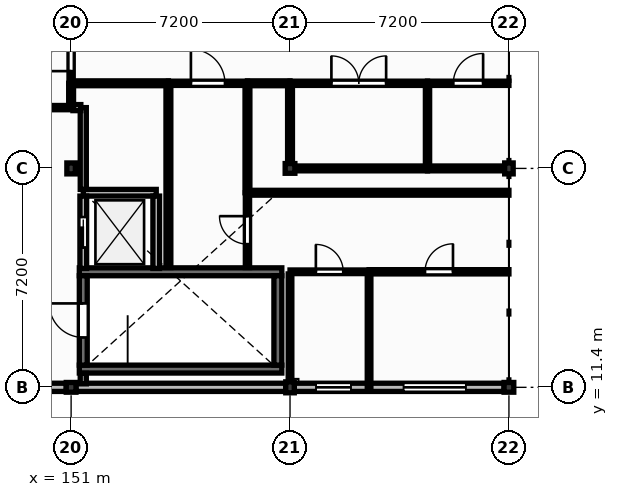
"""IFC4 building model, lengths in metres.
Left out: names, types, materials, properties, quantities, classifications, styles, units other than length and angle.
Written with IfcOpenShell. Run it as: python <this file> out.ifc"""

import sys

from ifc_helpers import new_model, si_unit, direction, frame, frame_2d, origin, origin_2d, place, context, subcontext, project, spatial, rectangle, extrude, element, fill, save


model = new_model("IFC4")
c1 = context("Model", 3, precision=1e-05, world=origin(), true_north=direction((0.0, 1.0)))
c2 = subcontext(c1, "Body", "Model", "MODEL_VIEW")
j1 = project(units=[si_unit("LENGTHUNIT", "METRE"), si_unit("PLANEANGLEUNIT", "RADIAN")], contexts=[c1])
p1 = place(None, origin())
s1 = spatial("IfcSite", under=j1, at=p1, CompositionType="ELEMENT")
p2 = place(p1, origin())
s2 = spatial("IfcBuilding", under=s1, at=p2, CompositionType="ELEMENT")
p3 = place(p2, frame((0.0, 0.0, 9.0)))
s3 = spatial("IfcBuildingStorey", under=s2, at=p3, CompositionType="ELEMENT", Elevation=9.0)
p4 = place(p3, frame((151.0, 11.4, 0.0), z_axis=(0.0, 0.0, 1.0), x_axis=(1.0, 0.0, 0.0)))
e1 = element("IfcColumn", 1, at=p4, inside=s3, PredefinedType="COLUMN", context=c2, shape_type="SweptSolid", body=[
    extrude(rectangle(XDim=0.32, YDim=0.32, at=origin_2d()), origin(), (0.0, 0.0, 1.0), 5.775),
])
p5 = place(p3, frame((151.0, 18.6, 0.0), z_axis=(0.0, 0.0, 1.0), x_axis=(1.0, 0.0, 0.0)))
e2 = element("IfcColumn", 2, at=p5, inside=s3, PredefinedType="COLUMN", context=c2, shape_type="SweptSolid", body=[
    extrude(rectangle(XDim=0.28, YDim=0.36, at=origin_2d()), origin(), (0.0, 0.0, 1.0), 5.775),
])
p6 = place(p3, frame((158.2, 11.4, 0.0), z_axis=(0.0, 0.0, 1.0), x_axis=(1.0, 0.0, 0.0)))
e3 = element("IfcColumn", 3, at=p6, inside=s3, PredefinedType="COLUMN", context=c2, shape_type="SweptSolid", body=[
    extrude(rectangle(XDim=0.28, YDim=0.36, at=origin_2d()), origin(), (0.0, 0.0, 1.0), 7.57),
])
p7 = place(p3, frame((158.2, 18.6, 0.0), z_axis=(0.0, 0.0, 1.0), x_axis=(1.0, 0.0, 0.0)))
e4 = element("IfcColumn", 4, at=p7, inside=s3, PredefinedType="COLUMN", context=c2, shape_type="SweptSolid", body=[
    extrude(rectangle(XDim=0.32, YDim=0.32, at=origin_2d()), origin(), (0.0, 0.0, 1.0), 7.57),
])
p8 = place(p3, frame((165.4, 11.4, 0.0), z_axis=(0.0, 0.0, 1.0), x_axis=(1.0, 0.0, 0.0)))
e5 = element("IfcColumn", 5, at=p8, inside=s3, PredefinedType="COLUMN", context=c2, shape_type="SweptSolid", body=[
    extrude(rectangle(XDim=0.32, YDim=0.32, at=origin_2d()), origin(), (0.0, 0.0, 1.0), 9.365),
])
p9 = place(p3, frame((165.4, 18.6, 0.0), z_axis=(0.0, 0.0, 1.0), x_axis=(1.0, 0.0, 0.0)))
e6 = element("IfcColumn", 6, at=p9, inside=s3, PredefinedType="COLUMN", context=c2, shape_type="SweptSolid", body=[
    extrude(rectangle(XDim=0.28, YDim=0.36, at=origin_2d()), origin(), (0.0, 0.0, 1.0), 9.365),
])
p10 = place(p3, frame((143.94, 11.4, 0.0), z_axis=(0.0, 0.0, 1.0), x_axis=(1.0, 0.0, 0.0)))
e7 = element("IfcWall", 7, at=p10, inside=s3, PredefinedType="SOLIDWALL", context=c2, shape_type="SweptSolid", body=[
    extrude(rectangle(XDim=6.9, YDim=0.27, at=frame_2d((3.45, 0.0))), origin(), (0.0, 0.0, 1.0), 3.54),
])
p11 = place(p10, frame((1.065, 0.0, 1.35)))
e8 = element("IfcOpeningElement", 8, at=p11, cuts=e7, PredefinedType="OPENING", context=c2, shape_type="SweptSolid", body=[
    extrude(rectangle(XDim=1.65, YDim=1.4, at=frame_2d((0.825, 0.7))), frame((0.0, 0.145, 0.0), z_axis=(0.0, -1.0, 0.0), x_axis=(1.0, 0.0, 0.0)), (0.0, 0.0, 1.0), 0.29),
])
p12 = place(p10, frame((4.34, 0.0, 1.0)))
e9 = element("IfcOpeningElement", 9, at=p12, cuts=e7, PredefinedType="OPENING", context=c2, shape_type="SweptSolid", body=[
    extrude(rectangle(XDim=1.76, YDim=1.95, at=frame_2d((0.88, 0.975))), frame((0.0, 0.145, 0.0), z_axis=(0.0, -1.0, 0.0), x_axis=(1.0, 0.0, 0.0)), (0.0, 0.0, 1.0), 0.29),
])
p13 = place(p3, frame((151.16, 11.4, 0.0), z_axis=(0.0, 0.0, 1.0), x_axis=(1.0, 0.0, 0.0)))
e10 = element("IfcWall", 10, at=p13, inside=s3, PredefinedType="SOLIDWALL", context=c2, shape_type="SweptSolid", body=[
    extrude(rectangle(XDim=6.9, YDim=0.27, at=frame_2d((3.45, 0.0))), origin(), (0.0, 0.0, 1.0), 3.54),
])
p14 = place(p3, frame((158.34, 11.4, 0.0), z_axis=(0.0, 0.0, 1.0), x_axis=(1.0, 0.0, 0.0)))
e11 = element("IfcWall", 11, at=p14, inside=s3, PredefinedType="SOLIDWALL", context=c2, shape_type="SweptSolid", body=[
    extrude(rectangle(XDim=6.9, YDim=0.27, at=frame_2d((3.45, 0.0))), origin(), (0.0, 0.0, 1.0), 3.54),
])
p15 = place(p14, frame((0.715, 0.0, 1.5)))
e12 = element("IfcOpeningElement", 12, at=p15, cuts=e11, PredefinedType="OPENING", context=c2, shape_type="SweptSolid", body=[
    extrude(rectangle(XDim=1.15, YDim=1.25, at=frame_2d((0.575, 0.625))), frame((0.0, 0.145, 0.0), z_axis=(0.0, -1.0, 0.0), x_axis=(1.0, 0.0, 0.0)), (0.0, 0.0, 1.0), 0.29),
])
p16 = place(p14, frame((3.595, 0.0, 1.0)))
e13 = element("IfcOpeningElement", 13, at=p16, cuts=e11, PredefinedType="OPENING", context=c2, shape_type="SweptSolid", body=[
    extrude(rectangle(XDim=2.05, YDim=1.95, at=frame_2d((1.025, 0.975))), frame((0.0, 0.145, 0.0), z_axis=(0.0, -1.0, 0.0), x_axis=(1.0, 0.0, 0.0)), (0.0, 0.0, 1.0), 0.29),
])
for number, where, z_axis, x_axis in (
    (14, (151.27, 12.0, 0.0), (0.0, 0.0, 1.0), (1.0, 0.0, 0.0)),
    (15, (151.27, 15.2, 0.0), (0.0, 0.0, 1.0), (1.0, 0.0, 0.0)),
):
    element("IfcWall", number, at=place(p3, frame(where, z_axis=z_axis, x_axis=x_axis)), inside=s3, PredefinedType="SHEAR", context=c2, shape_type="SweptSolid", body=[
        extrude(rectangle(XDim=6.66, YDim=0.26, at=frame_2d((3.33, 0.0))), origin(), (0.0, 0.0, 1.0), 3.95),
    ])
p17 = place(p3, frame((151.4, 12.13, 0.0), z_axis=(0.0, 0.0, 1.0), x_axis=(0.0, 1.0, 0.0)))
e16 = element("IfcWall", 16, at=p17, inside=s3, PredefinedType="SHEAR", context=c2, shape_type="SweptSolid", body=[
    extrude(rectangle(XDim=2.94, YDim=0.26, at=frame_2d((1.47, 0.0))), origin(), (0.0, 0.0, 1.0), 3.95),
])
p18 = place(p17, frame((0.91, 0.0, 0.0)))
e17 = element("IfcOpeningElement", 17, at=p18, cuts=e16, PredefinedType="OPENING", context=c2, shape_type="SweptSolid", body=[
    extrude(rectangle(XDim=1.12, YDim=2.1, at=frame_2d((0.56, 1.05))), frame((0.0, 0.14, 0.0), z_axis=(0.0, -1.0, 0.0), x_axis=(1.0, 0.0, 0.0)), (0.0, 0.0, 1.0), 0.28),
])
p19 = place(p3, frame((157.8, 12.13, 0.0), z_axis=(0.0, 0.0, 1.0), x_axis=(0.0, 1.0, 0.0)))
e18 = element("IfcWall", 18, at=p19, inside=s3, PredefinedType="SHEAR", context=c2, shape_type="SweptSolid", body=[
    extrude(rectangle(XDim=2.94, YDim=0.26, at=frame_2d((1.47, 0.0))), origin(), (0.0, 0.0, 1.0), 3.95),
])
p20 = place(p3, frame((151.4, 17.8, 0.0), z_axis=(0.0, 0.0, 1.0), x_axis=(1.0, 0.0, 0.0)))
e19 = element("IfcWall", 19, at=p20, inside=s3, PredefinedType="SOLIDWALL", context=c2, shape_type="SweptSolid", body=[
    extrude(rectangle(XDim=2.4, YDim=0.22, at=frame_2d((1.2, 0.0))), origin(), (0.0, 0.0, 1.0), 3.95),
])
p21 = place(p3, frame((151.4, 15.31, 0.0), z_axis=(0.0, 0.0, 1.0), x_axis=(0.0, 1.0, 0.0)))
e20 = element("IfcWall", 20, at=p21, inside=s3, PredefinedType="SOLIDWALL", context=c2, shape_type="SweptSolid", body=[
    extrude(rectangle(XDim=2.38, YDim=0.22, at=frame_2d((1.19, 0.0))), origin(), (0.0, 0.0, 1.0), 3.95),
])
p22 = place(p21, frame((0.69, 0.0, 0.0)))
e21 = element("IfcOpeningElement", 21, at=p22, cuts=e20, PredefinedType="OPENING", context=c2, shape_type="SweptSolid", body=[
    extrude(rectangle(XDim=1.0, YDim=2.15, at=frame_2d((0.5, 1.075))), frame((0.0, 0.12, 0.0), z_axis=(0.0, -1.0, 0.0), x_axis=(1.0, 0.0, 0.0)), (0.0, 0.0, 1.0), 0.24),
])
p23 = place(p3, frame((153.8, 15.31, 0.0), z_axis=(0.0, 0.0, 1.0), x_axis=(0.0, 1.0, 0.0)))
e22 = element("IfcWall", 22, at=p23, inside=s3, PredefinedType="SOLIDWALL", context=c2, shape_type="SweptSolid", body=[
    extrude(rectangle(XDim=2.38, YDim=0.22, at=frame_2d((1.19, 0.0))), origin(), (0.0, 0.0, 1.0), 3.95),
])
p24 = place(p3, frame((147.6, 20.6, 0.0), z_axis=(0.0, 0.0, 1.0), x_axis=(1.0, 0.0, 0.0)))
e23 = element("IfcWall", 23, at=p24, inside=s3, PredefinedType="PARTITIONING", context=c2, shape_type="SweptSolid", body=[
    extrude(rectangle(XDim=3.4, YDim=0.14, at=frame_2d((1.7, 0.0))), origin(), (0.0, 0.0, 1.0), 3.78),
])
p25 = place(p24, frame((1.24, 0.0, 0.0)))
e24 = element("IfcOpeningElement", 24, at=p25, cuts=e23, PredefinedType="OPENING", context=c2, shape_type="SweptSolid", body=[
    extrude(rectangle(XDim=0.92, YDim=2.1, at=frame_2d((0.46, 1.05))), frame((0.0, 0.08, 0.0), z_axis=(0.0, -1.0, 0.0), x_axis=(1.0, 0.0, 0.0)), (0.0, 0.0, 1.0), 0.16),
])
p26 = place(p3, frame((151.0, 21.4, 0.0), z_axis=(0.0, 0.0, 1.0), x_axis=(0.0, 1.0, 0.0)))
e25 = element("IfcWall", 25, at=p26, inside=s3, PredefinedType="PARTITIONING", context=c2, shape_type="SweptSolid", body=[
    extrude(rectangle(XDim=2.6, YDim=0.14, at=frame_2d((1.3, 0.0))), origin(), (0.0, 0.0, 1.0), 3.78),
])
p27 = place(p26, frame((0.4, 0.0, 0.0)))
e26 = element("IfcOpeningElement", 26, at=p27, cuts=e25, PredefinedType="OPENING", context=c2, shape_type="SweptSolid", body=[
    extrude(rectangle(XDim=1.8, YDim=2.3, at=frame_2d((0.9, 1.15))), frame((0.0, 0.08, 0.0), z_axis=(0.0, -1.0, 0.0), x_axis=(1.0, 0.0, 0.0)), (0.0, 0.0, 1.0), 0.16),
])
p28 = place(p3, frame((154.2, 21.4, 0.0), z_axis=(0.0, 0.0, 1.0), x_axis=(1.0, 0.0, 0.0)))
e27 = element("IfcWall", 27, at=p28, inside=s3, PredefinedType="PARTITIONING", context=c2, shape_type="SweptSolid", body=[
    extrude(rectangle(XDim=2.6, YDim=0.14, at=frame_2d((1.3, 0.0))), origin(), (0.0, 0.0, 1.0), 3.78),
])
p29 = place(p28, frame((0.74, 0.0, 0.0)))
e28 = element("IfcOpeningElement", 28, at=p29, cuts=e27, PredefinedType="OPENING", context=c2, shape_type="SweptSolid", body=[
    extrude(rectangle(XDim=1.12, YDim=2.15, at=frame_2d((0.56, 1.075))), frame((0.0, 0.08, 0.0), z_axis=(0.0, -1.0, 0.0), x_axis=(1.0, 0.0, 0.0)), (0.0, 0.0, 1.0), 0.16),
])
p30 = place(p3, frame((156.8, 15.34, 0.0), z_axis=(0.0, 0.0, 1.0), x_axis=(0.0, 1.0, 0.0)))
e29 = element("IfcWall", 29, at=p30, inside=s3, PredefinedType="PARTITIONING", context=c2, shape_type="SweptSolid", body=[
    extrude(rectangle(XDim=2.46, YDim=0.14, at=frame_2d((1.23, 0.0))), origin(), (0.0, 0.0, 1.0), 3.78),
])
p31 = place(p30, frame((0.77, 0.0, 0.0)))
e30 = element("IfcOpeningElement", 30, at=p31, cuts=e29, PredefinedType="OPENING", context=c2, shape_type="SweptSolid", body=[
    extrude(rectangle(XDim=0.92, YDim=2.1, at=frame_2d((0.46, 1.05))), frame((0.0, 0.08, 0.0), z_axis=(0.0, -1.0, 0.0), x_axis=(1.0, 0.0, 0.0)), (0.0, 0.0, 1.0), 0.16),
])
p32 = place(p3, frame((158.2, 15.2, 0.0), z_axis=(0.0, 0.0, 1.0), x_axis=(1.0, 0.0, 0.0)))
e31 = element("IfcWall", 31, at=p32, inside=s3, PredefinedType="PLUMBINGWALL", context=c2, shape_type="SweptSolid", body=[
    extrude(rectangle(XDim=2.6, YDim=0.12, at=frame_2d((1.3, 0.0))), origin(), (0.0, 0.0, 1.0), 3.78),
])
p33 = place(p32, frame((0.85, 0.0, 0.0)))
e32 = element("IfcOpeningElement", 32, at=p33, cuts=e31, PredefinedType="OPENING", context=c2, shape_type="SweptSolid", body=[
    extrude(rectangle(XDim=0.9, YDim=2.1, at=frame_2d((0.45, 1.05))), frame((0.0, 0.07, 0.0), z_axis=(0.0, -1.0, 0.0), x_axis=(1.0, 0.0, 0.0)), (0.0, 0.0, 1.0), 0.14),
])
p34 = place(p3, frame((158.2, 21.4, 0.0), z_axis=(0.0, 0.0, 1.0), x_axis=(1.0, 0.0, 0.0)))
e33 = element("IfcWall", 33, at=p34, inside=s3, PredefinedType="PARTITIONING", context=c2, shape_type="SweptSolid", body=[
    extrude(rectangle(XDim=4.522, YDim=0.14, at=frame_2d((2.261, 0.0))), origin(), (0.0, 0.0, 1.0), 3.78),
])
p35 = place(p34, frame((1.361, 0.0, 0.0)))
e34 = element("IfcOpeningElement", 34, at=p35, cuts=e33, PredefinedType="OPENING", context=c2, shape_type="SweptSolid", body=[
    extrude(rectangle(XDim=1.8, YDim=2.3, at=frame_2d((0.9, 1.15))), frame((0.0, 0.08, 0.0), z_axis=(0.0, -1.0, 0.0), x_axis=(1.0, 0.0, 0.0)), (0.0, 0.0, 1.0), 0.16),
])
p36 = place(p3, frame((160.8, 11.4, 0.0), z_axis=(0.0, 0.0, 1.0), x_axis=(0.0, 1.0, 0.0)))
e35 = element("IfcWall", 35, at=p36, inside=s3, PredefinedType="PLUMBINGWALL", context=c2, shape_type="SweptSolid", body=[
    extrude(rectangle(XDim=3.73, YDim=0.12, at=frame_2d((1.865, 0.0))), origin(), (0.0, 0.0, 1.0), 3.78),
])
p37 = place(p3, frame((160.8, 15.2, 0.0), z_axis=(0.0, 0.0, 1.0), x_axis=(1.0, 0.0, 0.0)))
e36 = element("IfcWall", 36, at=p37, inside=s3, PredefinedType="PARTITIONING", context=c2, shape_type="SweptSolid", body=[
    extrude(rectangle(XDim=4.6, YDim=0.14, at=frame_2d((2.3, 0.0))), origin(), (0.0, 0.0, 1.0), 3.78),
])
p38 = place(p37, frame((1.84, 0.0, 0.0)))
e37 = element("IfcOpeningElement", 37, at=p38, cuts=e36, PredefinedType="OPENING", context=c2, shape_type="SweptSolid", body=[
    extrude(rectangle(XDim=0.92, YDim=2.1, at=frame_2d((0.46, 1.05))), frame((0.0, 0.08, 0.0), z_axis=(0.0, -1.0, 0.0), x_axis=(1.0, 0.0, 0.0)), (0.0, 0.0, 1.0), 0.16),
])
p39 = place(p3, frame((162.722, 18.6, 0.0), z_axis=(0.0, 0.0, 1.0), x_axis=(0.0, 1.0, 0.0)))
e38 = element("IfcWall", 38, at=p39, inside=s3, PredefinedType="PARTITIONING", context=c2, shape_type="SweptSolid", body=[
    extrude(rectangle(XDim=2.73, YDim=0.14, at=frame_2d((1.365, 0.0))), origin(), (0.0, 0.0, 1.0), 3.78),
])
p40 = place(p3, frame((162.722, 21.4, 0.0), z_axis=(0.0, 0.0, 1.0), x_axis=(1.0, 0.0, 0.0)))
e39 = element("IfcWall", 39, at=p40, inside=s3, PredefinedType="PARTITIONING", context=c2, shape_type="SweptSolid", body=[
    extrude(rectangle(XDim=2.678, YDim=0.14, at=frame_2d((1.339, 0.0))), origin(), (0.0, 0.0, 1.0), 3.78),
])
p41 = place(p40, frame((0.849, 0.0, 0.0)))
e40 = element("IfcOpeningElement", 40, at=p41, cuts=e39, PredefinedType="OPENING", context=c2, shape_type="SweptSolid", body=[
    extrude(rectangle(XDim=0.98, YDim=2.15, at=frame_2d((0.49, 1.075))), frame((0.0, 0.08, 0.0), z_axis=(0.0, -1.0, 0.0), x_axis=(1.0, 0.0, 0.0)), (0.0, 0.0, 1.0), 0.16),
])
p42 = place(p3, frame((151.4, 11.515, 0.0), z_axis=(0.0, 0.0, 1.0), x_axis=(0.0, 1.0, 0.0)))
e41 = element("IfcWall", 41, at=p42, inside=s3, PredefinedType="PARTITIONING", context=c2, shape_type="SweptSolid", body=[
    extrude(rectangle(XDim=0.345, YDim=0.2, at=frame_2d((0.173, 0.0))), origin(), (0.0, 0.0, 1.0), 3.78),
])
p43 = place(p3, frame((151.4, 17.91, 0.0), z_axis=(0.0, 0.0, 1.0), x_axis=(0.0, 1.0, 0.0)))
e42 = element("IfcWall", 42, at=p43, inside=s3, PredefinedType="PARTITIONING", context=c2, shape_type="SweptSolid", body=[
    extrude(rectangle(XDim=2.69, YDim=0.2, at=frame_2d((1.345, 0.0))), origin(), (0.0, 0.0, 1.0), 3.78),
])
p44 = place(p3, frame((151.32, 20.6, 0.0), z_axis=(0.0, 0.0, 1.0), x_axis=(-1.0, 0.0, 0.0)))
e43 = element("IfcWall", 43, at=p44, inside=s3, PredefinedType="PARTITIONING", context=c2, shape_type="SweptSolid", body=[
    extrude(rectangle(XDim=0.26, YDim=0.2, at=frame_2d((0.13, 0.0))), origin(), (0.0, 0.0, 1.0), 3.78),
])
p45 = place(p3, frame((151.0, 20.67, 0.0), z_axis=(0.0, 0.0, 1.0), x_axis=(0.0, 1.0, 0.0)))
e44 = element("IfcWall", 44, at=p45, inside=s3, PredefinedType="PARTITIONING", context=c2, shape_type="SweptSolid", body=[
    extrude(rectangle(XDim=0.73, YDim=0.16, at=frame_2d((0.365, 0.0))), origin(), (0.0, 0.0, 1.0), 3.78),
])
p46 = place(p3, frame((151.0, 21.4, 0.0), z_axis=(0.0, 0.0, 1.0), x_axis=(1.0, 0.0, 0.0)))
e45 = element("IfcWall", 45, at=p46, inside=s3, PredefinedType="PARTITIONING", context=c2, shape_type="SweptSolid", body=[
    extrude(rectangle(XDim=3.2, YDim=0.16, at=frame_2d((1.6, 0.0))), origin(), (0.0, 0.0, 1.0), 3.78),
])
p47 = place(p3, frame((156.8, 21.4, 0.0), z_axis=(0.0, 0.0, 1.0), x_axis=(1.0, 0.0, 0.0)))
e46 = element("IfcWall", 46, at=p47, inside=s3, PredefinedType="PARTITIONING", context=c2, shape_type="SweptSolid", body=[
    extrude(rectangle(XDim=1.4, YDim=0.16, at=frame_2d((0.7, 0.0))), origin(), (0.0, 0.0, 1.0), 3.78),
])
p48 = place(p3, frame((156.8, 17.8, 0.0), z_axis=(0.0, 0.0, 1.0), x_axis=(0.0, 1.0, 0.0)))
e47 = element("IfcWall", 47, at=p48, inside=s3, PredefinedType="PARTITIONING", context=c2, shape_type="SweptSolid", body=[
    extrude(rectangle(XDim=3.53, YDim=0.16, at=frame_2d((1.765, 0.0))), origin(), (0.0, 0.0, 1.0), 3.78),
])
p49 = place(p3, frame((154.2, 15.34, 0.0), z_axis=(0.0, 0.0, 1.0), x_axis=(0.0, 1.0, 0.0)))
e48 = element("IfcWall", 48, at=p49, inside=s3, PredefinedType="PARTITIONING", context=c2, shape_type="SweptSolid", body=[
    extrude(rectangle(XDim=5.99, YDim=0.16, at=frame_2d((2.995, 0.0))), origin(), (0.0, 0.0, 1.0), 3.78),
])
p50 = place(p3, frame((165.4, 17.8, 0.0), z_axis=(0.0, 0.0, 1.0), x_axis=(-1.0, 0.0, 0.0)))
e49 = element("IfcWall", 49, at=p50, inside=s3, PredefinedType="PARTITIONING", context=c2, shape_type="SweptSolid", body=[
    extrude(rectangle(XDim=8.6, YDim=0.16, at=frame_2d((4.3, 0.0))), origin(), (0.0, 0.0, 1.0), 3.78),
])
p51 = place(p3, frame((158.2, 11.58, 0.0), z_axis=(0.0, 0.0, 1.0), x_axis=(0.0, 1.0, 0.0)))
e50 = element("IfcWall", 50, at=p51, inside=s3, PredefinedType="PLUMBINGWALL", context=c2, shape_type="SweptSolid", body=[
    extrude(rectangle(XDim=3.55, YDim=0.12, at=frame_2d((1.775, 0.0))), origin(), (0.0, 0.0, 1.0), 3.78),
])
p52 = place(p3, frame((158.36, 18.6, 0.0), z_axis=(0.0, 0.0, 1.0), x_axis=(1.0, 0.0, 0.0)))
e51 = element("IfcWall", 51, at=p52, inside=s3, PredefinedType="PARTITIONING", context=c2, shape_type="SweptSolid", body=[
    extrude(rectangle(XDim=4.362, YDim=0.16, at=frame_2d((2.181, 0.0))), origin(), (0.0, 0.0, 1.0), 3.78),
])
p53 = place(p3, frame((158.2, 18.76, 0.0), z_axis=(0.0, 0.0, 1.0), x_axis=(0.0, 1.0, 0.0)))
e52 = element("IfcWall", 52, at=p53, inside=s3, PredefinedType="PARTITIONING", context=c2, shape_type="SweptSolid", body=[
    extrude(rectangle(XDim=2.57, YDim=0.16, at=frame_2d((1.285, 0.0))), origin(), (0.0, 0.0, 1.0), 3.78),
])
p54 = place(p3, frame((162.722, 18.6, 0.0), z_axis=(0.0, 0.0, 1.0), x_axis=(1.0, 0.0, 0.0)))
e53 = element("IfcWall", 53, at=p54, inside=s3, PredefinedType="PARTITIONING", context=c2, shape_type="SweptSolid", body=[
    extrude(rectangle(XDim=2.538, YDim=0.16, at=frame_2d((1.269, 0.0))), origin(), (0.0, 0.0, 1.0), 3.78),
])
p55 = place(p15, origin())
e54 = element("IfcWindow", 54, at=p55, inside=s3, PartitioningType="SINGLE_PANEL", PredefinedType="WINDOW", context=c2, shape_type="SweptSolid", body=[
    extrude(rectangle(XDim=1.15, YDim=1.25, at=frame_2d((0.575, 0.625))), frame((0.0, 0.03, 0.0), z_axis=(0.0, -1.0, 0.0), x_axis=(1.0, 0.0, 0.0)), (0.0, 0.0, 1.0), 0.06),
])
fill(e12, e54)
p56 = place(p16, origin())
e55 = element("IfcWindow", 55, at=p56, inside=s3, PartitioningType="DOUBLE_PANEL_VERTICAL", PredefinedType="WINDOW", context=c2, shape_type="SweptSolid", body=[
    extrude(rectangle(XDim=2.05, YDim=1.95, at=frame_2d((1.025, 0.975))), frame((0.0, 0.03, 0.0), z_axis=(0.0, -1.0, 0.0), x_axis=(1.0, 0.0, 0.0)), (0.0, 0.0, 1.0), 0.06),
])
fill(e13, e55)
p57 = place(p22, origin())
e56 = element("IfcDoor", 56, at=p57, inside=s3, OperationType="SLIDING_TO_LEFT", PredefinedType="DOOR", context=c2, shape_type="SweptSolid", body=[
    extrude(rectangle(XDim=1.0, YDim=2.15, at=frame_2d((0.5, 1.075))), frame((0.0, 0.025, 0.0), z_axis=(0.0, -1.0, 0.0), x_axis=(1.0, 0.0, 0.0)), (0.0, 0.0, 1.0), 0.05),
])
fill(e21, e56)
p58 = place(p18, origin())
e57 = element("IfcDoor", 57, at=p58, inside=s3, OperationType="SINGLE_SWING_RIGHT", PredefinedType="DOOR", context=c2, shape_type="SweptSolid", body=[
    extrude(rectangle(XDim=1.12, YDim=2.1, at=frame_2d((0.56, 1.05))), frame((0.0, 0.025, 0.0), z_axis=(0.0, -1.0, 0.0), x_axis=(1.0, 0.0, 0.0)), (0.0, 0.0, 1.0), 0.05),
])
fill(e17, e57)
p59 = place(p27, origin())
e58 = element("IfcDoor", 58, at=p59, inside=s3, OperationType="DOUBLE_DOOR_SINGLE_SWING", PredefinedType="DOOR", context=c2, shape_type="SweptSolid", body=[
    extrude(rectangle(XDim=1.8, YDim=2.3, at=frame_2d((0.9, 1.15))), frame((0.0, 0.025, 0.0), z_axis=(0.0, -1.0, 0.0), x_axis=(1.0, 0.0, 0.0)), (0.0, 0.0, 1.0), 0.05),
])
fill(e26, e58)
p60 = place(p29, origin())
e59 = element("IfcDoor", 59, at=p60, inside=s3, OperationType="SINGLE_SWING_LEFT", PredefinedType="DOOR", context=c2, shape_type="SweptSolid", body=[
    extrude(rectangle(XDim=1.12, YDim=2.15, at=frame_2d((0.56, 1.075))), frame((0.0, 0.025, 0.0), z_axis=(0.0, -1.0, 0.0), x_axis=(1.0, 0.0, 0.0)), (0.0, 0.0, 1.0), 0.05),
])
fill(e28, e59)
p61 = place(p31, origin())
e60 = element("IfcDoor", 60, at=p61, inside=s3, OperationType="SINGLE_SWING_RIGHT", PredefinedType="DOOR", context=c2, shape_type="SweptSolid", body=[
    extrude(rectangle(XDim=0.92, YDim=2.1, at=frame_2d((0.46, 1.05))), frame((0.0, 0.025, 0.0), z_axis=(0.0, -1.0, 0.0), x_axis=(1.0, 0.0, 0.0)), (0.0, 0.0, 1.0), 0.05),
])
fill(e30, e60)
p62 = place(p33, origin())
e61 = element("IfcDoor", 61, at=p62, inside=s3, OperationType="SINGLE_SWING_LEFT", PredefinedType="DOOR", context=c2, shape_type="SweptSolid", body=[
    extrude(rectangle(XDim=0.9, YDim=2.1, at=frame_2d((0.45, 1.05))), frame((0.0, 0.025, 0.0), z_axis=(0.0, -1.0, 0.0), x_axis=(1.0, 0.0, 0.0)), (0.0, 0.0, 1.0), 0.05),
])
fill(e32, e61)
p63 = place(p38, origin())
e62 = element("IfcDoor", 62, at=p63, inside=s3, OperationType="SINGLE_SWING_RIGHT", PredefinedType="DOOR", context=c2, shape_type="SweptSolid", body=[
    extrude(rectangle(XDim=0.92, YDim=2.1, at=frame_2d((0.46, 1.05))), frame((0.0, 0.025, 0.0), z_axis=(0.0, -1.0, 0.0), x_axis=(1.0, 0.0, 0.0)), (0.0, 0.0, 1.0), 0.05),
])
fill(e37, e62)
p64 = place(p35, origin())
e63 = element("IfcDoor", 63, at=p64, inside=s3, OperationType="DOUBLE_DOOR_SINGLE_SWING", PredefinedType="DOOR", context=c2, shape_type="SweptSolid", body=[
    extrude(rectangle(XDim=1.8, YDim=2.3, at=frame_2d((0.9, 1.15))), frame((0.0, 0.025, 0.0), z_axis=(0.0, -1.0, 0.0), x_axis=(1.0, 0.0, 0.0)), (0.0, 0.0, 1.0), 0.05),
])
fill(e34, e63)
p65 = place(p41, origin())
e64 = element("IfcDoor", 64, at=p65, inside=s3, OperationType="SINGLE_SWING_RIGHT", PredefinedType="DOOR", context=c2, shape_type="SweptSolid", body=[
    extrude(rectangle(XDim=0.98, YDim=2.15, at=frame_2d((0.49, 1.075))), frame((0.0, 0.025, 0.0), z_axis=(0.0, -1.0, 0.0), x_axis=(1.0, 0.0, 0.0)), (0.0, 0.0, 1.0), 0.05),
])
fill(e40, e64)
save(model, sys.argv[1])
